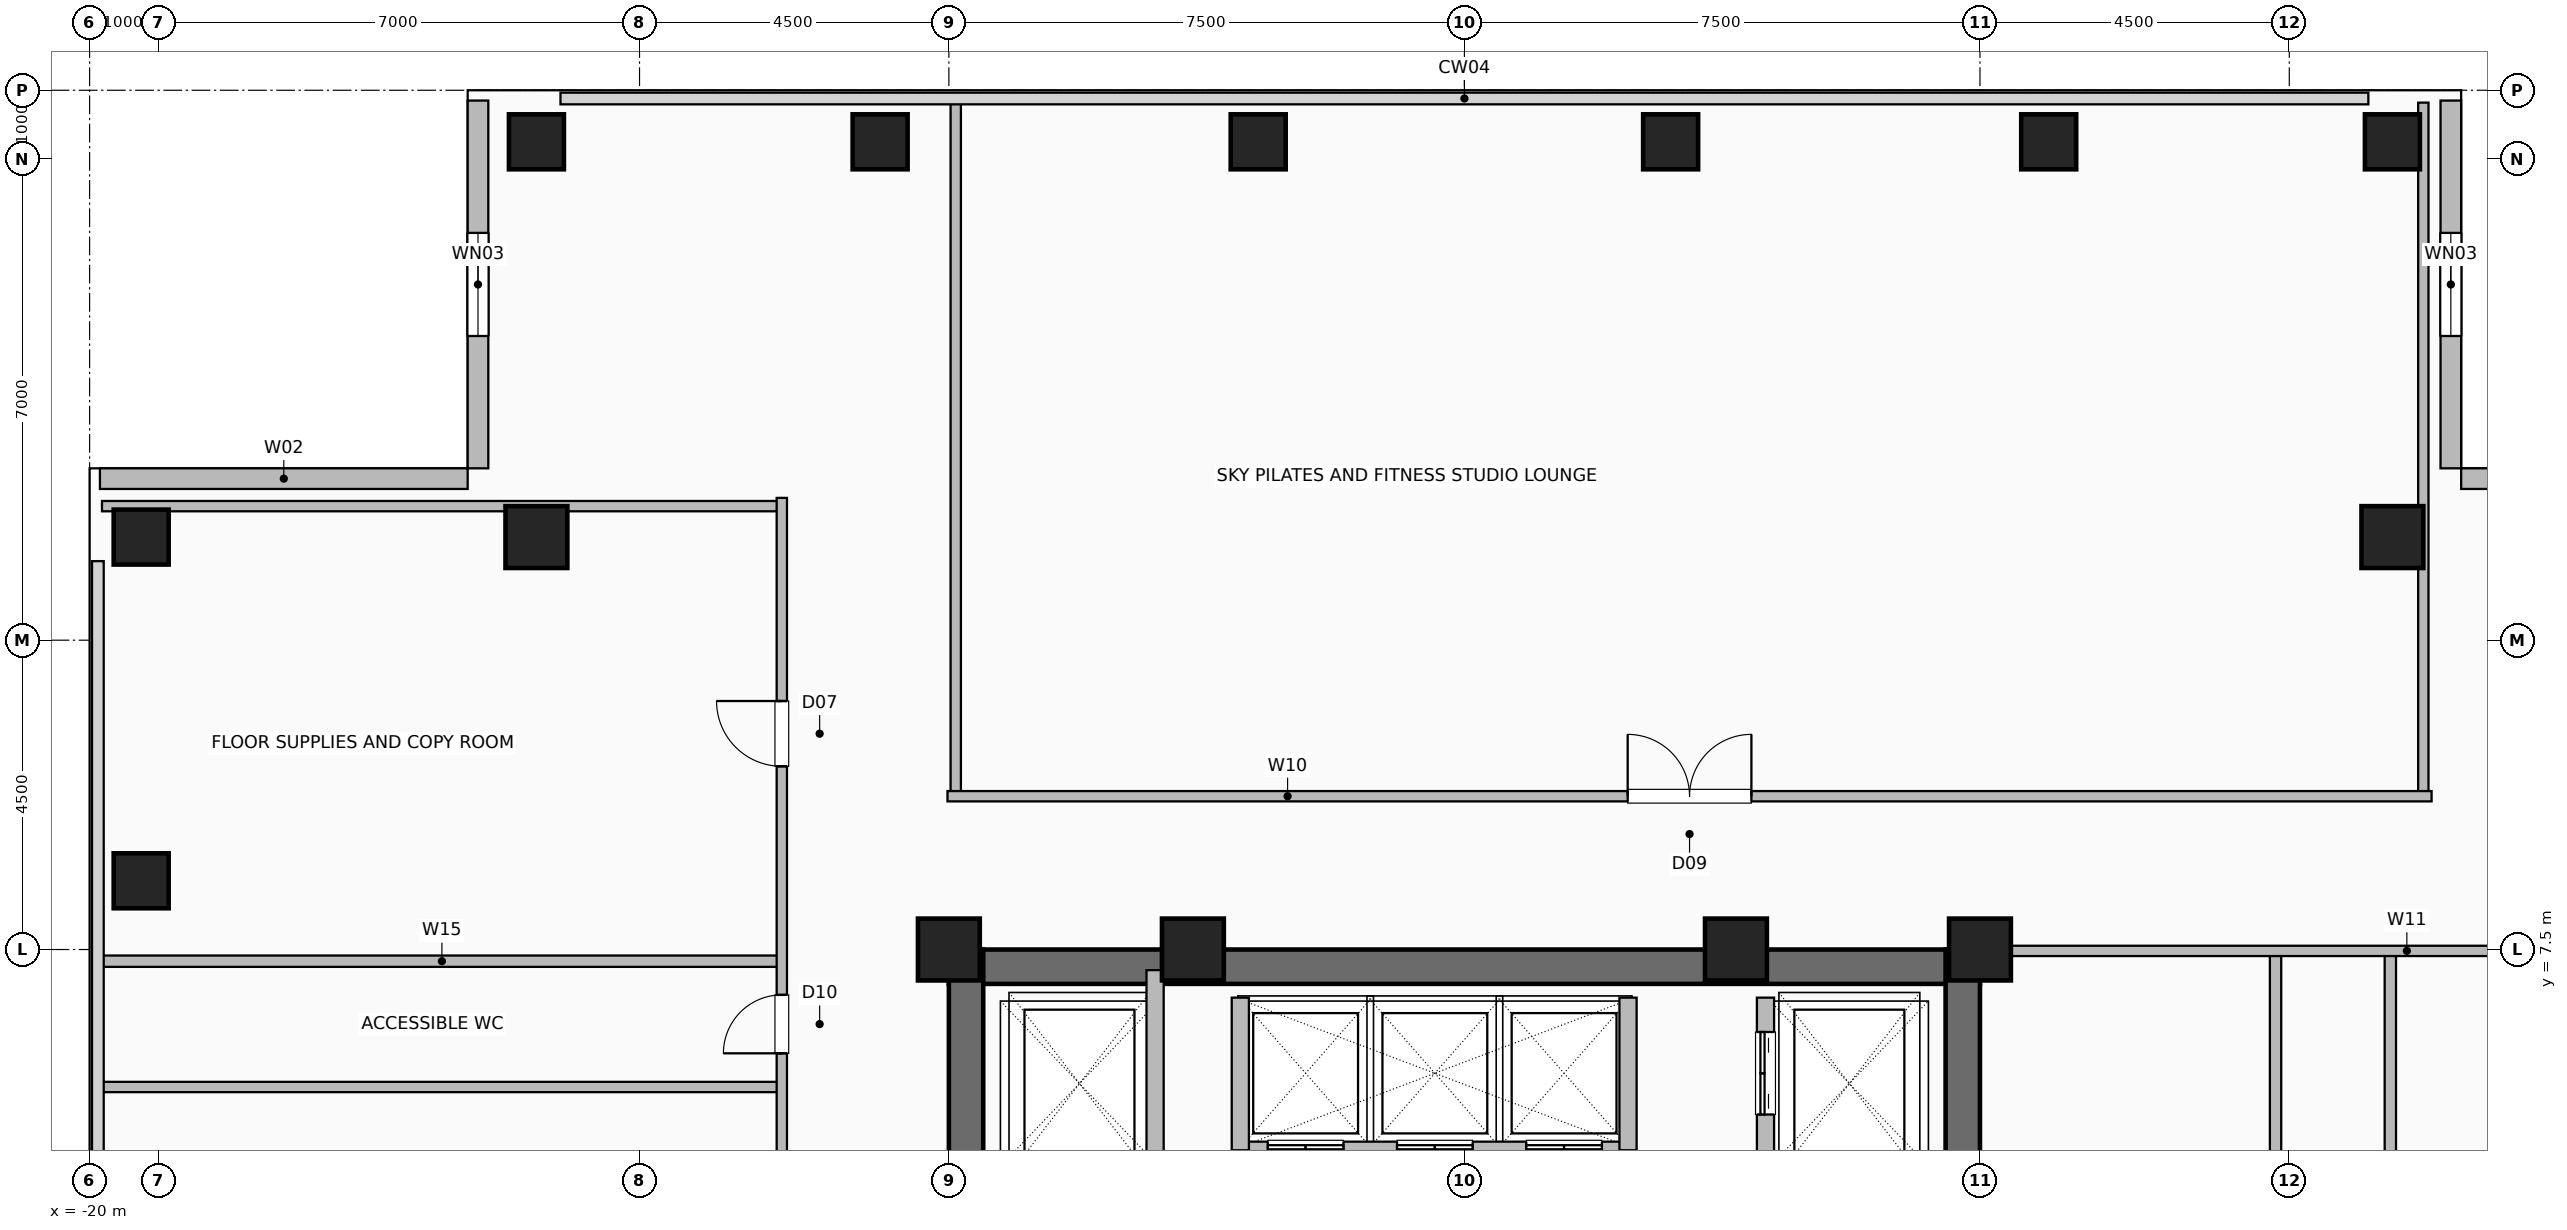
"""IFC4 building model, lengths in metres.
Left out: names, types, materials, properties, quantities, classifications, styles, units other than length and angle.
Written with IfcOpenShell. Run it as: python <this file> out.ifc"""

import sys

from ifc_helpers import new_model, si_unit, direction, frame, frame_2d, origin, origin_2d, place, context, subcontext, project, spatial, rectangle, hollow_rectangle, extrude, element, fill, save


model = new_model("IFC4")
c1 = context("Model", 3, precision=1e-05, world=origin(), true_north=direction((0.0, 1.0)))
c2 = subcontext(c1, "Body", "Model", "MODEL_VIEW")
j1 = project(units=[si_unit("LENGTHUNIT", "METRE"), si_unit("PLANEANGLEUNIT", "RADIAN")], contexts=[c1])
p1 = place(None, origin())
s1 = spatial("IfcSite", under=j1, at=p1, CompositionType="ELEMENT")
p2 = place(p1, origin())
s2 = spatial("IfcBuilding", under=s1, at=p2, CompositionType="ELEMENT")
p3 = place(p2, frame((0.0, 0.0, 209.4)))
s3 = spatial("IfcBuildingStorey", under=s2, at=p3, CompositionType="ELEMENT", Elevation=209.4)
for number, where, z_axis, x_axis in (
    (1, (7.5, 7.5, 0.0), (0.0, 0.0, 1.0), (1.0, 0.0, 0.0)),
    (2, (3.95, 7.5, 0.0), (0.0, 0.0, 1.0), (1.0, 0.0, 0.0)),
    (3, (-3.95, 7.5, 0.0), (0.0, 0.0, 1.0), (1.0, 0.0, 0.0)),
    (4, (-7.5, 7.5, 0.0), (0.0, 0.0, 1.0), (1.0, 0.0, 0.0)),
):
    element("IfcColumn", number, at=place(p3, frame(where, z_axis=z_axis, x_axis=x_axis)), inside=s3, PredefinedType="COLUMN", context=c2, shape_type="SweptSolid", body=[
        extrude(hollow_rectangle(XDim=0.9, YDim=0.9, WallThickness=0.045, at=origin_2d()), origin(), (0.0, 0.0, 1.0), 3.6),
    ])
for number, where, z_axis, x_axis in (
    (5, (-13.5, 19.25, 0.0), (0.0, 0.0, 1.0), (1.0, 0.0, 0.0)),
    (6, (-8.5, 19.25, 0.0), (0.0, 0.0, 1.0), (1.0, 0.0, 0.0)),
    (7, (-3.0, 19.25, 0.0), (0.0, 0.0, 1.0), (1.0, 0.0, 0.0)),
    (8, (3.0, 19.25, 0.0), (0.0, 0.0, 1.0), (1.0, 0.0, 0.0)),
    (9, (8.5, 19.25, 0.0), (0.0, 0.0, 1.0), (1.0, 0.0, 0.0)),
    (10, (-19.25, 8.5, 0.0), (0.0, 0.0, 1.0), (1.0, 0.0, 0.0)),
    (11, (13.5, 19.25, 0.0), (0.0, 0.0, 1.0), (1.0, 0.0, 0.0)),
    (12, (-19.25, 13.5, 0.0), (0.0, 0.0, 1.0), (1.0, 0.0, 0.0)),
):
    element("IfcColumn", number, at=place(p3, frame(where, z_axis=z_axis, x_axis=x_axis)), inside=s3, PredefinedType="COLUMN", context=c2, shape_type="SweptSolid", body=[
        extrude(hollow_rectangle(XDim=0.8, YDim=0.8, WallThickness=0.04, at=origin_2d()), origin(), (0.0, 0.0, 1.0), 3.6),
    ])
for number, where, z_axis, x_axis in (
    (13, (13.5, 13.5, 0.0), (0.0, 0.0, 1.0), (1.0, 0.0, 0.0)),
    (14, (-13.5, 13.5, 0.0), (0.0, 0.0, 1.0), (1.0, 0.0, 0.0)),
):
    element("IfcColumn", number, at=place(p3, frame(where, z_axis=z_axis, x_axis=x_axis)), inside=s3, PredefinedType="COLUMN", context=c2, shape_type="SweptSolid", body=[
        extrude(hollow_rectangle(XDim=0.9, YDim=0.9, WallThickness=0.045, at=origin_2d()), origin(), (0.0, 0.0, 1.0), 3.6),
    ])
p4 = place(p3, frame((14.35, 19.85, 0.0), z_axis=(0.0, 0.0, 1.0), x_axis=(0.0, -1.0, 0.0)))
e15 = element("IfcWall", 15, at=p4, inside=s3, PredefinedType="SOLIDWALL", context=c2, shape_type="SweptSolid", body=[
    extrude(rectangle(XDim=5.35, YDim=0.3, at=frame_2d((2.675, 0.0))), origin(), (0.0, 0.0, 1.0), 3.36),
])
p5 = place(p4, frame((1.925, 0.0, 0.9)))
e16 = element("IfcOpeningElement", 16, at=p5, cuts=e15, PredefinedType="OPENING", context=c2, shape_type="SweptSolid", body=[
    extrude(rectangle(XDim=1.5, YDim=1.8, at=frame_2d((0.75, 0.9))), frame((0.0, 0.16, 0.0), z_axis=(0.0, -1.0, 0.0), x_axis=(1.0, 0.0, 0.0)), (0.0, 0.0, 1.0), 0.32),
])
p6 = place(p3, frame((19.85, 14.35, 0.0), z_axis=(0.0, 0.0, 1.0), x_axis=(-1.0, 0.0, 0.0)))
e17 = element("IfcWall", 17, at=p6, inside=s3, PredefinedType="SOLIDWALL", context=c2, shape_type="SweptSolid", body=[
    extrude(rectangle(XDim=5.35, YDim=0.3, at=frame_2d((2.675, 0.0))), origin(), (0.0, 0.0, 1.0), 3.36),
])
p7 = place(p3, frame((-14.35, 19.85, 0.0), z_axis=(0.0, 0.0, 1.0), x_axis=(0.0, -1.0, 0.0)))
e18 = element("IfcWall", 18, at=p7, inside=s3, PredefinedType="SOLIDWALL", context=c2, shape_type="SweptSolid", body=[
    extrude(rectangle(XDim=5.35, YDim=0.3, at=frame_2d((2.675, 0.0))), origin(), (0.0, 0.0, 1.0), 3.36),
])
p8 = place(p7, frame((1.925, 0.0, 0.9)))
e19 = element("IfcOpeningElement", 19, at=p8, cuts=e18, PredefinedType="OPENING", context=c2, shape_type="SweptSolid", body=[
    extrude(rectangle(XDim=1.5, YDim=1.8, at=frame_2d((0.75, 0.9))), frame((0.0, 0.16, 0.0), z_axis=(0.0, -1.0, 0.0), x_axis=(1.0, 0.0, 0.0)), (0.0, 0.0, 1.0), 0.32),
])
p9 = place(p3, frame((-19.85, 14.35, 0.0), z_axis=(0.0, 0.0, 1.0), x_axis=(1.0, 0.0, 0.0)))
e20 = element("IfcWall", 20, at=p9, inside=s3, PredefinedType="SOLIDWALL", context=c2, shape_type="SweptSolid", body=[
    extrude(rectangle(XDim=5.35, YDim=0.3, at=frame_2d((2.675, 0.0))), origin(), (0.0, 0.0, 1.0), 3.36),
])
p10 = place(p3, frame((-7.5, 7.25, 0.0), z_axis=(0.0, 0.0, 1.0), x_axis=(1.0, 0.0, 0.0)))
e21 = element("IfcWall", 21, at=p10, inside=s3, PredefinedType="SHEAR", context=c2, shape_type="SweptSolid", body=[
    extrude(rectangle(XDim=15.0, YDim=0.5, at=frame_2d((7.5, 0.0))), origin(), (0.0, 0.0, 1.0), 3.36),
])
p11 = place(p3, frame((-7.25, -7.5, 0.0), z_axis=(0.0, 0.0, 1.0), x_axis=(0.0, 1.0, 0.0)))
e22 = element("IfcWall", 22, at=p11, inside=s3, PredefinedType="SHEAR", context=c2, shape_type="SweptSolid", body=[
    extrude(rectangle(XDim=15.0, YDim=0.5, at=frame_2d((7.5, 0.0))), origin(), (0.0, 0.0, 1.0), 3.36),
])
p12 = place(p11, frame((9.5, 0.0, 0.0)))
e23 = element("IfcOpeningElement", 23, at=p12, cuts=e22, PredefinedType="OPENING", context=c2, shape_type="SweptSolid", body=[
    extrude(rectangle(XDim=1.0, YDim=2.08, at=frame_2d((0.5, 1.04))), frame((0.0, 0.26, 0.0), z_axis=(0.0, -1.0, 0.0), x_axis=(1.0, 0.0, 0.0)), (0.0, 0.0, 1.0), 0.52),
])
p13 = place(p3, frame((7.25, -7.5, 0.0), z_axis=(0.0, 0.0, 1.0), x_axis=(0.0, 1.0, 0.0)))
e24 = element("IfcWall", 24, at=p13, inside=s3, PredefinedType="SHEAR", context=c2, shape_type="SweptSolid", body=[
    extrude(rectangle(XDim=15.0, YDim=0.5, at=frame_2d((7.5, 0.0))), origin(), (0.0, 0.0, 1.0), 3.36),
])
p14 = place(p3, frame((-3.26, 4.58, 0.0), z_axis=(0.0, 0.0, 1.0), x_axis=(1.0, 0.0, 0.0)))
e25 = element("IfcWall", 25, at=p14, inside=s3, PredefinedType="SHEAR", context=c2, shape_type="SweptSolid", body=[
    extrude(rectangle(XDim=5.64, YDim=0.25, at=frame_2d((2.82, 0.0))), origin(), (0.0, 0.0, 1.0), 3.36),
])
p15 = place(p14, frame((0.4, 0.0, 0.0)))
e26 = element("IfcOpeningElement", 26, at=p15, cuts=e25, PredefinedType="OPENING", context=c2, shape_type="SweptSolid", body=[
    extrude(rectangle(XDim=1.1, YDim=2.2, at=frame_2d((0.55, 1.1))), frame((0.0, 0.135, 0.0), z_axis=(0.0, -1.0, 0.0), x_axis=(1.0, 0.0, 0.0)), (0.0, 0.0, 1.0), 0.27),
])
p16 = place(p14, frame((2.28, 0.0, 0.0)))
e27 = element("IfcOpeningElement", 27, at=p16, cuts=e25, PredefinedType="OPENING", context=c2, shape_type="SweptSolid", body=[
    extrude(rectangle(XDim=1.1, YDim=2.2, at=frame_2d((0.55, 1.1))), frame((0.0, 0.135, 0.0), z_axis=(0.0, -1.0, 0.0), x_axis=(1.0, 0.0, 0.0)), (0.0, 0.0, 1.0), 0.27),
])
p17 = place(p14, frame((4.16, 0.0, 0.0)))
e28 = element("IfcOpeningElement", 28, at=p17, cuts=e25, PredefinedType="OPENING", context=c2, shape_type="SweptSolid", body=[
    extrude(rectangle(XDim=1.1, YDim=2.2, at=frame_2d((0.55, 1.1))), frame((0.0, 0.135, 0.0), z_axis=(0.0, -1.0, 0.0), x_axis=(1.0, 0.0, 0.0)), (0.0, 0.0, 1.0), 0.27),
])
for number, where, z_axis, x_axis in (
    (29, (-3.26, 4.58, 0.0), (0.0, 0.0, 1.0), (0.0, 1.0, 0.0)),
    (30, (2.38, 4.58, 0.0), (0.0, 0.0, 1.0), (0.0, 1.0, 0.0)),
):
    element("IfcWall", number, at=place(p3, frame(where, z_axis=z_axis, x_axis=x_axis)), inside=s3, PredefinedType="SHEAR", context=c2, shape_type="SweptSolid", body=[
        extrude(rectangle(XDim=2.22, YDim=0.25, at=frame_2d((1.11, 0.0))), origin(), (0.0, 0.0, 1.0), 3.36),
    ])
p18 = place(p3, frame((-4.5, 4.35, 0.0), z_axis=(0.0, 0.0, 1.0), x_axis=(0.0, 1.0, 0.0)))
e31 = element("IfcWall", 31, at=p18, inside=s3, PredefinedType="SHEAR", context=c2, shape_type="SweptSolid", body=[
    extrude(rectangle(XDim=2.85, YDim=0.25, at=frame_2d((1.425, 0.0))), origin(), (0.0, 0.0, 1.0), 3.36),
])
p19 = place(p3, frame((4.38, 4.3, 0.0), z_axis=(0.0, 0.0, 1.0), x_axis=(0.0, 1.0, 0.0)))
e32 = element("IfcWall", 32, at=p19, inside=s3, PredefinedType="SHEAR", context=c2, shape_type="SweptSolid", body=[
    extrude(rectangle(XDim=2.5, YDim=0.25, at=frame_2d((1.25, 0.0))), origin(), (0.0, 0.0, 1.0), 3.36),
])
p20 = place(p19, frame((0.8, 0.0, 0.0)))
e33 = element("IfcOpeningElement", 33, at=p20, cuts=e32, PredefinedType="OPENING", context=c2, shape_type="SweptSolid", body=[
    extrude(rectangle(XDim=1.2, YDim=2.2, at=frame_2d((0.6, 1.1))), frame((0.0, 0.135, 0.0), z_axis=(0.0, -1.0, 0.0), x_axis=(1.0, 0.0, 0.0)), (0.0, 0.0, 1.0), 0.27),
])
p21 = place(p3, frame((-19.82, 7.33, 0.0), z_axis=(0.0, 0.0, 1.0), x_axis=(1.0, 0.0, 0.0)))
e34 = element("IfcWall", 34, at=p21, inside=s3, PredefinedType="PLUMBINGWALL", context=c2, shape_type="SweptSolid", body=[
    extrude(rectangle(XDim=9.89, YDim=0.165, at=frame_2d((4.945, 0.0))), origin(), (0.0, 0.0, 1.0), 3.36),
])
for number, where, z_axis, x_axis in (
    (35, (-19.82, 5.5, 0.0), (0.0, 0.0, 1.0), (1.0, 0.0, 0.0)),
    (36, (-19.82, 13.95, 0.0), (0.0, 0.0, 1.0), (1.0, 0.0, 0.0)),
):
    element("IfcWall", number, at=place(p3, frame(where, z_axis=z_axis, x_axis=x_axis)), inside=s3, PredefinedType="PARTITIONING", context=c2, shape_type="SweptSolid", body=[
        extrude(rectangle(XDim=9.89, YDim=0.15, at=frame_2d((4.945, 0.0))), origin(), (0.0, 0.0, 1.0), 3.36),
    ])
p22 = place(p3, frame((-9.93, -7.52, 0.0), z_axis=(0.0, 0.0, 1.0), x_axis=(0.0, 1.0, 0.0)))
e37 = element("IfcWall", 37, at=p22, inside=s3, PredefinedType="PARTITIONING", context=c2, shape_type="SweptSolid", body=[
    extrude(rectangle(XDim=21.59, YDim=0.15, at=frame_2d((10.795, 0.0))), origin(), (0.0, 0.0, 1.0), 3.36),
])
p23 = place(p22, frame((2.595, 0.0, 0.0)))
e38 = element("IfcOpeningElement", 38, at=p23, cuts=e37, PredefinedType="OPENING", context=c2, shape_type="SweptSolid", body=[
    extrude(rectangle(XDim=0.95, YDim=2.06, at=frame_2d((0.475, 1.03))), frame((0.0, 0.085, 0.0), z_axis=(0.0, -1.0, 0.0), x_axis=(1.0, 0.0, 0.0)), (0.0, 0.0, 1.0), 0.17),
])
p24 = place(p22, frame((9.045, 0.0, 0.0)))
e39 = element("IfcOpeningElement", 39, at=p24, cuts=e37, PredefinedType="OPENING", context=c2, shape_type="SweptSolid", body=[
    extrude(rectangle(XDim=0.95, YDim=2.06, at=frame_2d((0.475, 1.03))), frame((0.0, 0.085, 0.0), z_axis=(0.0, -1.0, 0.0), x_axis=(1.0, 0.0, 0.0)), (0.0, 0.0, 1.0), 0.17),
])
p25 = place(p22, frame((13.51, 0.0, 0.0)))
e40 = element("IfcOpeningElement", 40, at=p25, cuts=e37, PredefinedType="OPENING", context=c2, shape_type="SweptSolid", body=[
    extrude(rectangle(XDim=0.85, YDim=2.05, at=frame_2d((0.425, 1.025))), frame((0.0, 0.085, 0.0), z_axis=(0.0, -1.0, 0.0), x_axis=(1.0, 0.0, 0.0)), (0.0, 0.0, 1.0), 0.17),
])
p26 = place(p22, frame((17.685, 0.0, 0.0)))
e41 = element("IfcOpeningElement", 41, at=p26, cuts=e37, PredefinedType="OPENING", context=c2, shape_type="SweptSolid", body=[
    extrude(rectangle(XDim=0.95, YDim=2.06, at=frame_2d((0.475, 1.03))), frame((0.0, 0.085, 0.0), z_axis=(0.0, -1.0, 0.0), x_axis=(1.0, 0.0, 0.0)), (0.0, 0.0, 1.0), 0.17),
])
for number, where, z_axis, x_axis in (
    (42, (-7.4, 9.73, 0.0), (0.0, 0.0, 1.0), (0.0, 1.0, 0.0)),
    (43, (13.95, 9.73, 0.0), (0.0, 0.0, 1.0), (0.0, 1.0, 0.0)),
):
    element("IfcWall", number, at=place(p3, frame(where, z_axis=z_axis, x_axis=x_axis)), inside=s3, PredefinedType="PARTITIONING", context=c2, shape_type="SweptSolid", body=[
        extrude(rectangle(XDim=10.09, YDim=0.15, at=frame_2d((5.045, 0.0))), origin(), (0.0, 0.0, 1.0), 3.36),
    ])
p27 = place(p3, frame((-7.52, 9.73, 0.0), z_axis=(0.0, 0.0, 1.0), x_axis=(1.0, 0.0, 0.0)))
e44 = element("IfcWall", 44, at=p27, inside=s3, PredefinedType="PARTITIONING", context=c2, shape_type="SweptSolid", body=[
    extrude(rectangle(XDim=21.59, YDim=0.15, at=frame_2d((10.795, 0.0))), origin(), (0.0, 0.0, 1.0), 3.36),
])
p28 = place(p27, frame((9.895, 0.0, 0.0)))
e45 = element("IfcOpeningElement", 45, at=p28, cuts=e44, PredefinedType="OPENING", context=c2, shape_type="SweptSolid", body=[
    extrude(rectangle(XDim=1.8, YDim=2.08, at=frame_2d((0.9, 1.04))), frame((0.0, 0.085, 0.0), z_axis=(0.0, -1.0, 0.0), x_axis=(1.0, 0.0, 0.0)), (0.0, 0.0, 1.0), 0.17),
])
p29 = place(p3, frame((13.47, -7.48, 0.0), z_axis=(0.0, 0.0, 1.0), x_axis=(0.0, 1.0, 0.0)))
e46 = element("IfcWall", 46, at=p29, inside=s3, PredefinedType="PLUMBINGWALL", context=c2, shape_type="SweptSolid", body=[
    extrude(rectangle(XDim=14.9, YDim=0.165, at=frame_2d((7.45, 0.0))), origin(), (0.0, 0.0, 1.0), 2.981),
])
p30 = place(p3, frame((11.8, -7.48, 0.0), z_axis=(0.0, 0.0, 1.0), x_axis=(0.0, 1.0, 0.0)))
e47 = element("IfcWall", 47, at=p30, inside=s3, PredefinedType="PLUMBINGWALL", context=c2, shape_type="SweptSolid", body=[
    extrude(rectangle(XDim=14.9, YDim=0.165, at=frame_2d((7.45, 0.0))), origin(), (0.0, 0.0, 1.0), 3.36),
])
p31 = place(p3, frame((7.6, 7.48, 0.0), z_axis=(0.0, 0.0, 1.0), x_axis=(1.0, 0.0, 0.0)))
e48 = element("IfcWall", 48, at=p31, inside=s3, PredefinedType="PARTITIONING", context=c2, shape_type="SweptSolid", body=[
    extrude(rectangle(XDim=12.22, YDim=0.15, at=frame_2d((6.11, 0.0))), origin(), (0.0, 0.0, 1.0), 3.36),
])
p32 = place(p5, origin())
e49 = element("IfcWindow", 49, at=p32, inside=s3, PartitioningType="SINGLE_PANEL", PredefinedType="WINDOW", context=c2, shape_type="SweptSolid", body=[
    extrude(rectangle(XDim=1.5, YDim=1.8, at=frame_2d((0.75, 0.9))), frame((0.0, 0.03, 0.0), z_axis=(0.0, -1.0, 0.0), x_axis=(1.0, 0.0, 0.0)), (0.0, 0.0, 1.0), 0.06),
])
fill(e16, e49)
p33 = place(p8, origin())
e50 = element("IfcWindow", 50, at=p33, inside=s3, PartitioningType="SINGLE_PANEL", PredefinedType="WINDOW", context=c2, shape_type="SweptSolid", body=[
    extrude(rectangle(XDim=1.5, YDim=1.8, at=frame_2d((0.75, 0.9))), frame((0.0, 0.03, 0.0), z_axis=(0.0, -1.0, 0.0), x_axis=(1.0, 0.0, 0.0)), (0.0, 0.0, 1.0), 0.06),
])
fill(e19, e50)
p34 = place(p15, origin())
e51 = element("IfcDoor", 51, at=p34, inside=s3, OperationType="DOUBLE_DOOR_SLIDING", PredefinedType="DOOR", context=c2, shape_type="SweptSolid", body=[
    extrude(rectangle(XDim=1.1, YDim=2.2, at=frame_2d((0.55, 1.1))), frame((0.0, 0.025, 0.0), z_axis=(0.0, -1.0, 0.0), x_axis=(1.0, 0.0, 0.0)), (0.0, 0.0, 1.0), 0.05),
])
fill(e26, e51)
p35 = place(p16, origin())
e52 = element("IfcDoor", 52, at=p35, inside=s3, OperationType="DOUBLE_DOOR_SLIDING", PredefinedType="DOOR", context=c2, shape_type="SweptSolid", body=[
    extrude(rectangle(XDim=1.1, YDim=2.2, at=frame_2d((0.55, 1.1))), frame((0.0, 0.025, 0.0), z_axis=(0.0, -1.0, 0.0), x_axis=(1.0, 0.0, 0.0)), (0.0, 0.0, 1.0), 0.05),
])
fill(e27, e52)
p36 = place(p17, origin())
e53 = element("IfcDoor", 53, at=p36, inside=s3, OperationType="DOUBLE_DOOR_SLIDING", PredefinedType="DOOR", context=c2, shape_type="SweptSolid", body=[
    extrude(rectangle(XDim=1.1, YDim=2.2, at=frame_2d((0.55, 1.1))), frame((0.0, 0.025, 0.0), z_axis=(0.0, -1.0, 0.0), x_axis=(1.0, 0.0, 0.0)), (0.0, 0.0, 1.0), 0.05),
])
fill(e28, e53)
p37 = place(p20, origin())
e54 = element("IfcDoor", 54, at=p37, inside=s3, OperationType="DOUBLE_DOOR_SLIDING", PredefinedType="DOOR", context=c2, shape_type="SweptSolid", body=[
    extrude(rectangle(XDim=1.2, YDim=2.2, at=frame_2d((0.6, 1.1))), frame((0.0, 0.025, 0.0), z_axis=(0.0, -1.0, 0.0), x_axis=(1.0, 0.0, 0.0)), (0.0, 0.0, 1.0), 0.05),
])
fill(e33, e54)
p38 = place(p25, origin())
e55 = element("IfcDoor", 55, at=p38, inside=s3, OperationType="SINGLE_SWING_LEFT", PredefinedType="DOOR", context=c2, shape_type="SweptSolid", body=[
    extrude(rectangle(XDim=0.85, YDim=2.05, at=frame_2d((0.425, 1.025))), frame((0.0, 0.025, 0.0), z_axis=(0.0, -1.0, 0.0), x_axis=(1.0, 0.0, 0.0)), (0.0, 0.0, 1.0), 0.05),
])
fill(e40, e55)
p39 = place(p26, origin())
e56 = element("IfcDoor", 56, at=p39, inside=s3, OperationType="SINGLE_SWING_RIGHT", PredefinedType="DOOR", context=c2, shape_type="SweptSolid", body=[
    extrude(rectangle(XDim=0.95, YDim=2.06, at=frame_2d((0.475, 1.03))), frame((0.0, 0.025, 0.0), z_axis=(0.0, -1.0, 0.0), x_axis=(1.0, 0.0, 0.0)), (0.0, 0.0, 1.0), 0.05),
])
fill(e41, e56)
p40 = place(p28, origin())
e57 = element("IfcDoor", 57, at=p40, inside=s3, OperationType="DOUBLE_DOOR_SINGLE_SWING", PredefinedType="DOOR", context=c2, shape_type="SweptSolid", body=[
    extrude(rectangle(XDim=1.8, YDim=2.08, at=frame_2d((0.9, 1.04))), frame((0.0, 0.025, 0.0), z_axis=(0.0, -1.0, 0.0), x_axis=(1.0, 0.0, 0.0)), (0.0, 0.0, 1.0), 0.05),
])
fill(e45, e57)
save(model, sys.argv[1])
